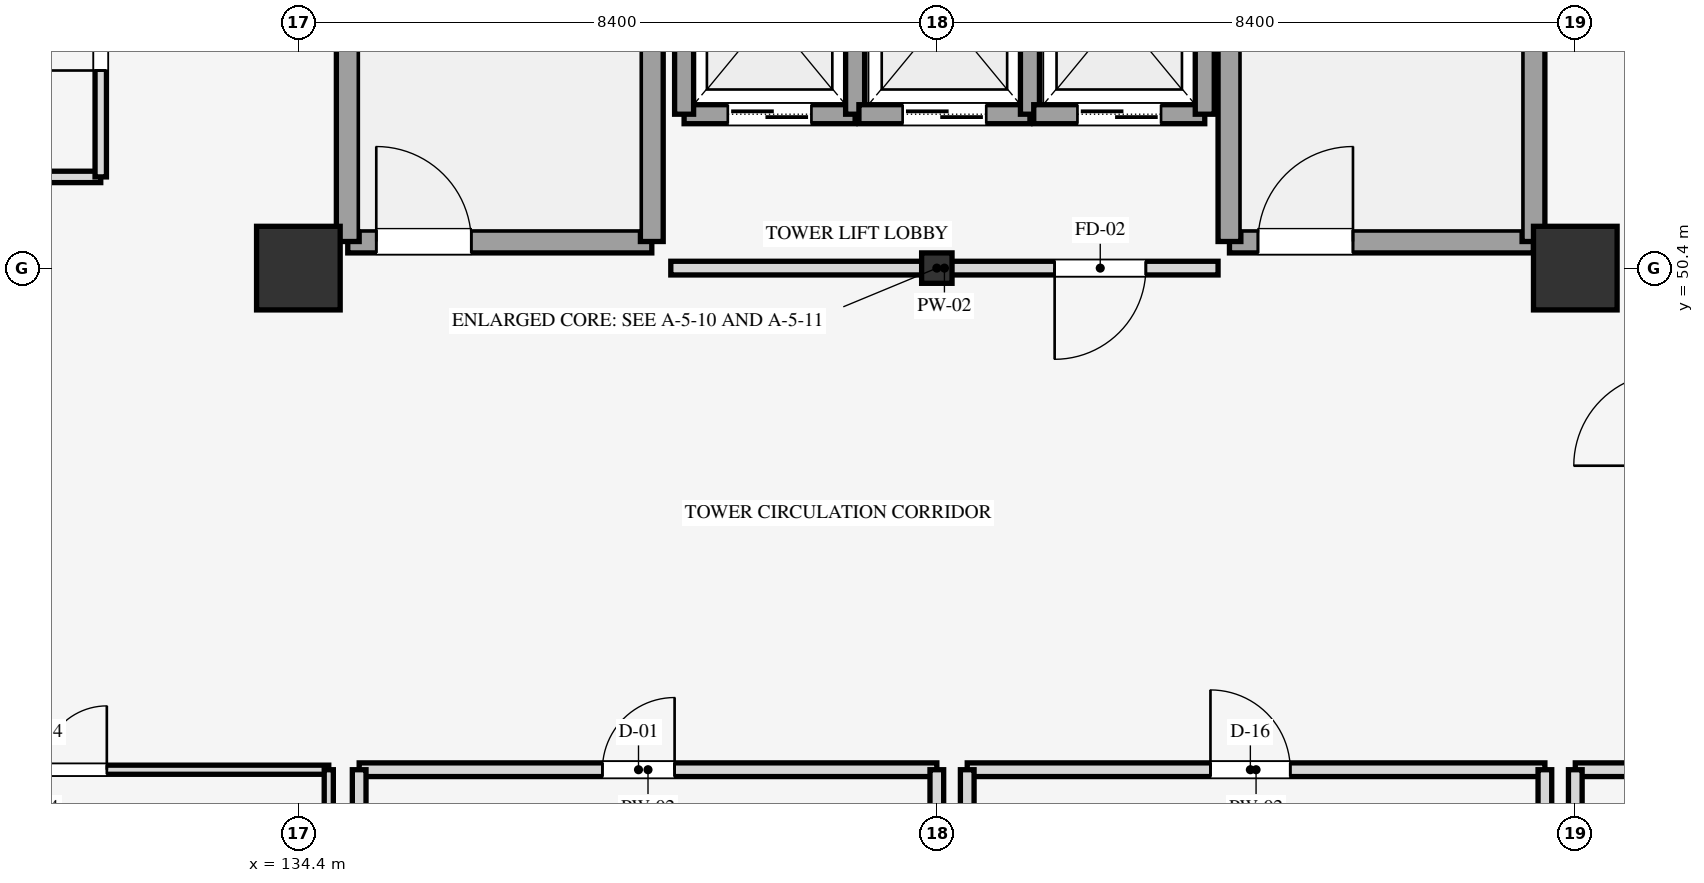
"""IFC4 building model, lengths in metres.
Left out: names, types, materials, properties, quantities, classifications, styles, units other than length and angle.
Written with IfcOpenShell. Run it as: python <this file> out.ifc"""

import sys

from ifc_helpers import new_model, si_unit, direction, frame, frame_2d, origin, origin_2d, place, context, subcontext, project, spatial, rectangle, i_section, extrude, element, fill, save


model = new_model("IFC4")
c1 = context("Model", 3, precision=1e-05, world=origin(), true_north=direction((0.0, 1.0)))
c2 = subcontext(c1, "Body", "Model", "MODEL_VIEW")
j1 = project(units=[si_unit("LENGTHUNIT", "METRE"), si_unit("PLANEANGLEUNIT", "RADIAN")], contexts=[c1])
p1 = place(None, origin())
s1 = spatial("IfcSite", under=j1, at=p1, CompositionType="ELEMENT")
p2 = place(p1, origin())
s2 = spatial("IfcBuilding", under=s1, at=p2, CompositionType="ELEMENT")
p3 = place(p2, frame((0.0, 0.0, 27.9)))
s3 = spatial("IfcBuildingStorey", under=s2, at=p3, CompositionType="ELEMENT", Elevation=27.9)
p4 = place(p3, frame((134.4, 50.4, 0.0), z_axis=(0.0, 0.0, 1.0), x_axis=(1.0, 0.0, 0.0)))
e1 = element("IfcColumn", 1, at=p4, inside=s3, PredefinedType="COLUMN", context=c2, shape_type="SweptSolid", body=[
    extrude(rectangle(XDim=1.1, YDim=1.1, at=origin_2d()), origin(), (0.0, 0.0, 1.0), 4.2),
])
p5 = place(p3, frame((142.8, 50.4, 0.0), z_axis=(0.0, 0.0, 1.0), x_axis=(1.0, 0.0, 0.0)))
e2 = element("IfcColumn", 2, at=p5, inside=s3, PredefinedType="COLUMN", context=c2, shape_type="SweptSolid", body=[
    extrude(i_section(OverallWidth=0.4, OverallDepth=0.4, WebThickness=0.013, FlangeThickness=0.021, FilletRadius=0.022, at=origin_2d()), origin(), (0.0, 0.0, 1.0), 4.2),
])
p6 = place(p3, frame((151.2, 50.4, 0.0), z_axis=(0.0, 0.0, 1.0), x_axis=(1.0, 0.0, 0.0)))
e3 = element("IfcColumn", 3, at=p6, inside=s3, PredefinedType="COLUMN", context=c2, shape_type="SweptSolid", body=[
    extrude(rectangle(XDim=1.1, YDim=1.1, at=origin_2d()), origin(), (0.0, 0.0, 1.0), 4.2),
])
p7 = place(p3, frame((135.05, 50.75, 0.0), z_axis=(0.0, 0.0, 1.0), x_axis=(1.0, 0.0, 0.0)))
e4 = element("IfcWall", 4, at=p7, inside=s3, PredefinedType="SHEAR", context=c2, shape_type="SweptSolid", body=[
    extrude(rectangle(XDim=4.0, YDim=0.3, at=frame_2d((2.0, 0.0))), origin(), (0.0, 0.0, 1.0), 4.2),
])
p8 = place(p7, frame((0.375, 0.0, 0.0)))
e5 = element("IfcOpeningElement", 5, at=p8, cuts=e4, PredefinedType="OPENING", context=c2, shape_type="SweptSolid", body=[
    extrude(rectangle(XDim=1.25, YDim=2.15, at=frame_2d((0.625, 1.075))), frame((0.0, 0.16, 0.0), z_axis=(0.0, -1.0, 0.0), x_axis=(1.0, 0.0, 0.0)), (0.0, 0.0, 1.0), 0.32),
])
for number, where, z_axis, x_axis in (
    (6, (135.05, 50.75, 0.0), (0.0, 0.0, 1.0), (0.0, 1.0, 0.0)),
    (7, (139.05, 50.75, 0.0), (0.0, 0.0, 1.0), (0.0, 1.0, 0.0)),
):
    element("IfcWall", number, at=place(p3, frame(where, z_axis=z_axis, x_axis=x_axis)), inside=s3, PredefinedType="SHEAR", context=c2, shape_type="SweptSolid", body=[
        extrude(rectangle(XDim=14.3, YDim=0.3, at=frame_2d((7.15, 0.0))), origin(), (0.0, 0.0, 1.0), 4.2),
    ])
p9 = place(p3, frame((137.25, 52.4, 0.0), z_axis=(0.0, 0.0, 1.0), x_axis=(0.0, 1.0, 0.0)))
e8 = element("IfcWall", 8, at=p9, inside=s3, PredefinedType="SHEAR", context=c2, shape_type="SweptSolid", body=[
    extrude(rectangle(XDim=11.0, YDim=0.2, at=frame_2d((5.5, 0.0))), origin(), (0.0, 0.0, 1.0), 4.2),
])
p10 = place(p3, frame((146.65, 50.75, 0.0), z_axis=(0.0, 0.0, 1.0), x_axis=(1.0, 0.0, 0.0)))
e9 = element("IfcWall", 9, at=p10, inside=s3, PredefinedType="SHEAR", context=c2, shape_type="SweptSolid", body=[
    extrude(rectangle(XDim=4.0, YDim=0.3, at=frame_2d((2.0, 0.0))), origin(), (0.0, 0.0, 1.0), 4.2),
])
p11 = place(p10, frame((0.375, 0.0, 0.0)))
e10 = element("IfcOpeningElement", 10, at=p11, cuts=e9, PredefinedType="OPENING", context=c2, shape_type="SweptSolid", body=[
    extrude(rectangle(XDim=1.25, YDim=2.15, at=frame_2d((0.625, 1.075))), frame((0.0, 0.16, 0.0), z_axis=(0.0, -1.0, 0.0), x_axis=(1.0, 0.0, 0.0)), (0.0, 0.0, 1.0), 0.32),
])
for number, where, z_axis, x_axis in (
    (11, (146.65, 50.75, 0.0), (0.0, 0.0, 1.0), (0.0, 1.0, 0.0)),
    (12, (150.65, 50.75, 0.0), (0.0, 0.0, 1.0), (0.0, 1.0, 0.0)),
):
    element("IfcWall", number, at=place(p3, frame(where, z_axis=z_axis, x_axis=x_axis)), inside=s3, PredefinedType="SHEAR", context=c2, shape_type="SweptSolid", body=[
        extrude(rectangle(XDim=14.3, YDim=0.3, at=frame_2d((7.15, 0.0))), origin(), (0.0, 0.0, 1.0), 4.2),
    ])
p12 = place(p3, frame((148.85, 52.4, 0.0), z_axis=(0.0, 0.0, 1.0), x_axis=(0.0, 1.0, 0.0)))
e13 = element("IfcWall", 13, at=p12, inside=s3, PredefinedType="SHEAR", context=c2, shape_type="SweptSolid", body=[
    extrude(rectangle(XDim=11.0, YDim=0.2, at=frame_2d((5.5, 0.0))), origin(), (0.0, 0.0, 1.0), 4.2),
])
p13 = place(p3, frame((139.475, 52.425, 0.0), z_axis=(0.0, 0.0, 1.0), x_axis=(1.0, 0.0, 0.0)))
e14 = element("IfcWall", 14, at=p13, inside=s3, PredefinedType="SHEAR", context=c2, shape_type="SweptSolid", body=[
    extrude(rectangle(XDim=2.25, YDim=0.25, at=frame_2d((1.125, 0.0))), origin(), (0.0, 0.0, 1.0), 3.96),
])
p14 = place(p13, frame((0.575, 0.0, 0.0)))
e15 = element("IfcOpeningElement", 15, at=p14, cuts=e14, PredefinedType="OPENING", context=c2, shape_type="SweptSolid", body=[
    extrude(rectangle(XDim=1.1, YDim=2.15, at=frame_2d((0.55, 1.075))), frame((0.0, 0.135, 0.0), z_axis=(0.0, -1.0, 0.0), x_axis=(1.0, 0.0, 0.0)), (0.0, 0.0, 1.0), 0.27),
])
for number, where, z_axis, x_axis in (
    (16, (139.475, 52.425, 0.0), (0.0, 0.0, 1.0), (0.0, 1.0, 0.0)),
    (17, (141.725, 52.425, 0.0), (0.0, 0.0, 1.0), (0.0, 1.0, 0.0)),
):
    element("IfcWall", number, at=place(p3, frame(where, z_axis=z_axis, x_axis=x_axis)), inside=s3, PredefinedType="SHEAR", context=c2, shape_type="SweptSolid", body=[
        extrude(rectangle(XDim=2.65, YDim=0.25, at=frame_2d((1.325, 0.0))), origin(), (0.0, 0.0, 1.0), 3.96),
    ])
p15 = place(p3, frame((141.775, 52.425, 0.0), z_axis=(0.0, 0.0, 1.0), x_axis=(1.0, 0.0, 0.0)))
e18 = element("IfcWall", 18, at=p15, inside=s3, PredefinedType="SHEAR", context=c2, shape_type="SweptSolid", body=[
    extrude(rectangle(XDim=2.25, YDim=0.25, at=frame_2d((1.125, 0.0))), origin(), (0.0, 0.0, 1.0), 3.96),
])
p16 = place(p15, frame((0.575, 0.0, 0.0)))
e19 = element("IfcOpeningElement", 19, at=p16, cuts=e18, PredefinedType="OPENING", context=c2, shape_type="SweptSolid", body=[
    extrude(rectangle(XDim=1.1, YDim=2.15, at=frame_2d((0.55, 1.075))), frame((0.0, 0.135, 0.0), z_axis=(0.0, -1.0, 0.0), x_axis=(1.0, 0.0, 0.0)), (0.0, 0.0, 1.0), 0.27),
])
p17 = place(p3, frame((144.025, 52.425, 0.0), z_axis=(0.0, 0.0, 1.0), x_axis=(0.0, 1.0, 0.0)))
e20 = element("IfcWall", 20, at=p17, inside=s3, PredefinedType="SHEAR", context=c2, shape_type="SweptSolid", body=[
    extrude(rectangle(XDim=2.65, YDim=0.25, at=frame_2d((1.325, 0.0))), origin(), (0.0, 0.0, 1.0), 3.96),
])
p18 = place(p3, frame((144.075, 52.425, 0.0), z_axis=(0.0, 0.0, 1.0), x_axis=(1.0, 0.0, 0.0)))
e21 = element("IfcWall", 21, at=p18, inside=s3, PredefinedType="SHEAR", context=c2, shape_type="SweptSolid", body=[
    extrude(rectangle(XDim=2.25, YDim=0.25, at=frame_2d((1.125, 0.0))), origin(), (0.0, 0.0, 1.0), 3.96),
])
p19 = place(p18, frame((0.575, 0.0, 0.0)))
e22 = element("IfcOpeningElement", 22, at=p19, cuts=e21, PredefinedType="OPENING", context=c2, shape_type="SweptSolid", body=[
    extrude(rectangle(XDim=1.1, YDim=2.15, at=frame_2d((0.55, 1.075))), frame((0.0, 0.135, 0.0), z_axis=(0.0, -1.0, 0.0), x_axis=(1.0, 0.0, 0.0)), (0.0, 0.0, 1.0), 0.27),
])
p20 = place(p3, frame((146.325, 52.425, 0.0), z_axis=(0.0, 0.0, 1.0), x_axis=(0.0, 1.0, 0.0)))
e23 = element("IfcWall", 23, at=p20, inside=s3, PredefinedType="SHEAR", context=c2, shape_type="SweptSolid", body=[
    extrude(rectangle(XDim=2.65, YDim=0.25, at=frame_2d((1.325, 0.0))), origin(), (0.0, 0.0, 1.0), 3.96),
])
p21 = place(p3, frame((139.3, 50.4, 0.0), z_axis=(0.0, 0.0, 1.0), x_axis=(1.0, 0.0, 0.0)))
e24 = element("IfcWall", 24, at=p21, inside=s3, PredefinedType="PARTITIONING", context=c2, shape_type="SweptSolid", body=[
    extrude(rectangle(XDim=7.2, YDim=0.18, at=frame_2d((3.6, 0.0))), origin(), (0.0, 0.0, 1.0), 3.24),
])
p22 = place(p21, frame((5.05, 0.0, 0.0)))
e25 = element("IfcOpeningElement", 25, at=p22, cuts=e24, PredefinedType="OPENING", context=c2, shape_type="SweptSolid", body=[
    extrude(rectangle(XDim=1.2, YDim=2.15, at=frame_2d((0.6, 1.075))), frame((0.0, 0.1, 0.0), z_axis=(0.0, -1.0, 0.0), x_axis=(1.0, 0.0, 0.0)), (0.0, 0.0, 1.0), 0.2),
])
p23 = place(p3, frame((127.75, 51.6, 0.0), z_axis=(0.0, 0.0, 1.0), x_axis=(1.0, 0.0, 0.0)))
e26 = element("IfcWall", 26, at=p23, inside=s3, PredefinedType="PARTITIONING", context=c2, shape_type="SweptSolid", body=[
    extrude(rectangle(XDim=4.05, YDim=0.15, at=frame_2d((2.025, 0.0))), origin(), (0.0, 0.0, 1.0), 3.24),
])
p24 = place(p3, frame((131.8, 51.6, 0.0), z_axis=(0.0, 0.0, 1.0), x_axis=(0.0, 1.0, 0.0)))
e27 = element("IfcWall", 27, at=p24, inside=s3, PredefinedType="PARTITIONING", context=c2, shape_type="SweptSolid", body=[
    extrude(rectangle(XDim=4.0, YDim=0.15, at=frame_2d((2.0, 0.0))), origin(), (0.0, 0.0, 1.0), 3.24),
])
p25 = place(p24, frame((1.4, 0.0, 0.0)))
e28 = element("IfcOpeningElement", 28, at=p25, cuts=e27, PredefinedType="OPENING", context=c2, shape_type="SweptSolid", body=[
    extrude(rectangle(XDim=1.12, YDim=2.14, at=frame_2d((0.56, 1.07))), frame((0.0, 0.085, 0.0), z_axis=(0.0, -1.0, 0.0), x_axis=(1.0, 0.0, 0.0)), (0.0, 0.0, 1.0), 0.17),
])
p26 = place(p3, frame((127.0, 43.8, 0.0), z_axis=(0.0, 0.0, 1.0), x_axis=(1.0, 0.0, 0.0)))
e29 = element("IfcWall", 29, at=p26, inside=s3, PredefinedType="PARTITIONING", context=c2, shape_type="SweptSolid", body=[
    extrude(rectangle(XDim=7.8, YDim=0.12, at=frame_2d((3.9, 0.0))), origin(), (0.0, 0.0, 1.0), 3.24),
])
p27 = place(p26, frame((3.2, 0.0, 0.0)))
e30 = element("IfcOpeningElement", 30, at=p27, cuts=e29, PredefinedType="OPENING", context=c2, shape_type="SweptSolid", body=[
    extrude(rectangle(XDim=1.68, YDim=2.24, at=frame_2d((0.84, 1.12))), frame((0.0, 0.07, 0.0), z_axis=(0.0, -1.0, 0.0), x_axis=(1.0, 0.0, 0.0)), (0.0, 0.0, 1.0), 0.14),
])
p28 = place(p3, frame((134.8, 34.4, 0.0), z_axis=(0.0, 0.0, 1.0), x_axis=(0.0, 1.0, 0.0)))
e31 = element("IfcWall", 31, at=p28, inside=s3, PredefinedType="PARTITIONING", context=c2, shape_type="SweptSolid", body=[
    extrude(rectangle(XDim=9.4, YDim=0.12, at=frame_2d((4.7, 0.0))), origin(), (0.0, 0.0, 1.0), 3.24),
])
p29 = place(p3, frame((135.2, 43.8, 0.0), z_axis=(0.0, 0.0, 1.0), x_axis=(1.0, 0.0, 0.0)))
e32 = element("IfcWall", 32, at=p29, inside=s3, PredefinedType="PARTITIONING", context=c2, shape_type="SweptSolid", body=[
    extrude(rectangle(XDim=7.6, YDim=0.18, at=frame_2d((3.8, 0.0))), origin(), (0.0, 0.0, 1.0), 3.24),
])
p30 = place(p29, frame((3.2, 0.0, 0.0)))
e33 = element("IfcOpeningElement", 33, at=p30, cuts=e32, PredefinedType="OPENING", context=c2, shape_type="SweptSolid", body=[
    extrude(rectangle(XDim=0.95, YDim=2.1, at=frame_2d((0.475, 1.05))), frame((0.0, 0.1, 0.0), z_axis=(0.0, -1.0, 0.0), x_axis=(1.0, 0.0, 0.0)), (0.0, 0.0, 1.0), 0.2),
])
for number, where, z_axis, x_axis in (
    (34, (135.2, 34.4, 0.0), (0.0, 0.0, 1.0), (0.0, 1.0, 0.0)),
    (35, (142.8, 34.4, 0.0), (0.0, 0.0, 1.0), (0.0, 1.0, 0.0)),
):
    element("IfcWall", number, at=place(p3, frame(where, z_axis=z_axis, x_axis=x_axis)), inside=s3, PredefinedType="PARTITIONING", context=c2, shape_type="SweptSolid", body=[
        extrude(rectangle(XDim=9.4, YDim=0.18, at=frame_2d((4.7, 0.0))), origin(), (0.0, 0.0, 1.0), 3.24),
    ])
p31 = place(p3, frame((143.2, 43.8, 0.0), z_axis=(0.0, 0.0, 1.0), x_axis=(1.0, 0.0, 0.0)))
e36 = element("IfcWall", 36, at=p31, inside=s3, PredefinedType="PARTITIONING", context=c2, shape_type="SweptSolid", body=[
    extrude(rectangle(XDim=7.6, YDim=0.18, at=frame_2d((3.8, 0.0))), origin(), (0.0, 0.0, 1.0), 3.24),
])
p32 = place(p31, frame((3.2, 0.0, 0.0)))
e37 = element("IfcOpeningElement", 37, at=p32, cuts=e36, PredefinedType="OPENING", context=c2, shape_type="SweptSolid", body=[
    extrude(rectangle(XDim=1.05, YDim=2.16, at=frame_2d((0.525, 1.08))), frame((0.0, 0.1, 0.0), z_axis=(0.0, -1.0, 0.0), x_axis=(1.0, 0.0, 0.0)), (0.0, 0.0, 1.0), 0.2),
])
for number, where, z_axis, x_axis in (
    (38, (143.2, 34.4, 0.0), (0.0, 0.0, 1.0), (0.0, 1.0, 0.0)),
    (39, (150.8, 34.4, 0.0), (0.0, 0.0, 1.0), (0.0, 1.0, 0.0)),
):
    element("IfcWall", number, at=place(p3, frame(where, z_axis=z_axis, x_axis=x_axis)), inside=s3, PredefinedType="PARTITIONING", context=c2, shape_type="SweptSolid", body=[
        extrude(rectangle(XDim=9.4, YDim=0.18, at=frame_2d((4.7, 0.0))), origin(), (0.0, 0.0, 1.0), 3.24),
    ])
p33 = place(p3, frame((151.2, 43.8, 0.0), z_axis=(0.0, 0.0, 1.0), x_axis=(1.0, 0.0, 0.0)))
e40 = element("IfcWall", 40, at=p33, inside=s3, PredefinedType="PARTITIONING", context=c2, shape_type="SweptSolid", body=[
    extrude(rectangle(XDim=7.8, YDim=0.18, at=frame_2d((3.9, 0.0))), origin(), (0.0, 0.0, 1.0), 3.24),
])
p34 = place(p33, frame((3.2, 0.0, 0.0)))
e41 = element("IfcOpeningElement", 41, at=p34, cuts=e40, PredefinedType="OPENING", context=c2, shape_type="SweptSolid", body=[
    extrude(rectangle(XDim=0.95, YDim=2.1, at=frame_2d((0.475, 1.05))), frame((0.0, 0.1, 0.0), z_axis=(0.0, -1.0, 0.0), x_axis=(1.0, 0.0, 0.0)), (0.0, 0.0, 1.0), 0.2),
])
p35 = place(p3, frame((151.2, 34.4, 0.0), z_axis=(0.0, 0.0, 1.0), x_axis=(0.0, 1.0, 0.0)))
e42 = element("IfcWall", 42, at=p35, inside=s3, PredefinedType="PARTITIONING", context=c2, shape_type="SweptSolid", body=[
    extrude(rectangle(XDim=9.4, YDim=0.18, at=frame_2d((4.7, 0.0))), origin(), (0.0, 0.0, 1.0), 3.24),
])
p36 = place(p8, origin())
e43 = element("IfcDoor", 43, at=p36, inside=s3, OperationType="SINGLE_SWING_LEFT", PredefinedType="DOOR", context=c2, shape_type="SweptSolid", body=[
    extrude(rectangle(XDim=1.25, YDim=2.15, at=frame_2d((0.625, 1.075))), frame((0.0, 0.025, 0.0), z_axis=(0.0, -1.0, 0.0), x_axis=(1.0, 0.0, 0.0)), (0.0, 0.0, 1.0), 0.05),
])
fill(e5, e43)
p37 = place(p11, origin())
e44 = element("IfcDoor", 44, at=p37, inside=s3, OperationType="SINGLE_SWING_RIGHT", PredefinedType="DOOR", context=c2, shape_type="SweptSolid", body=[
    extrude(rectangle(XDim=1.25, YDim=2.15, at=frame_2d((0.625, 1.075))), frame((0.0, 0.025, 0.0), z_axis=(0.0, -1.0, 0.0), x_axis=(1.0, 0.0, 0.0)), (0.0, 0.0, 1.0), 0.05),
])
fill(e10, e44)
p38 = place(p14, origin())
e45 = element("IfcDoor", 45, at=p38, inside=s3, OperationType="DOUBLE_DOOR_SLIDING", PredefinedType="DOOR", context=c2, shape_type="SweptSolid", body=[
    extrude(rectangle(XDim=1.1, YDim=2.15, at=frame_2d((0.55, 1.075))), frame((0.0, 0.025, 0.0), z_axis=(0.0, -1.0, 0.0), x_axis=(1.0, 0.0, 0.0)), (0.0, 0.0, 1.0), 0.05),
])
fill(e15, e45)
p39 = place(p16, origin())
e46 = element("IfcDoor", 46, at=p39, inside=s3, OperationType="DOUBLE_DOOR_SLIDING", PredefinedType="DOOR", context=c2, shape_type="SweptSolid", body=[
    extrude(rectangle(XDim=1.1, YDim=2.15, at=frame_2d((0.55, 1.075))), frame((0.0, 0.025, 0.0), z_axis=(0.0, -1.0, 0.0), x_axis=(1.0, 0.0, 0.0)), (0.0, 0.0, 1.0), 0.05),
])
fill(e19, e46)
p40 = place(p19, origin())
e47 = element("IfcDoor", 47, at=p40, inside=s3, OperationType="DOUBLE_DOOR_SLIDING", PredefinedType="DOOR", context=c2, shape_type="SweptSolid", body=[
    extrude(rectangle(XDim=1.1, YDim=2.15, at=frame_2d((0.55, 1.075))), frame((0.0, 0.025, 0.0), z_axis=(0.0, -1.0, 0.0), x_axis=(1.0, 0.0, 0.0)), (0.0, 0.0, 1.0), 0.05),
])
fill(e22, e47)
p41 = place(p22, frame((1.2, 0.0, 0.0), z_axis=(0.0, 0.0, 1.0), x_axis=(-1.0, 0.0, 0.0)))
e48 = element("IfcDoor", 48, at=p41, inside=s3, OperationType="SINGLE_SWING_RIGHT", PredefinedType="DOOR", context=c2, shape_type="SweptSolid", body=[
    extrude(rectangle(XDim=1.2, YDim=2.15, at=frame_2d((0.6, 1.075))), frame((0.0, 0.025, 0.0), z_axis=(0.0, -1.0, 0.0), x_axis=(1.0, 0.0, 0.0)), (0.0, 0.0, 1.0), 0.05),
])
fill(e25, e48)
p42 = place(p25, origin())
e49 = element("IfcDoor", 49, at=p42, inside=s3, OperationType="SINGLE_SWING_LEFT", PredefinedType="DOOR", context=c2, shape_type="SweptSolid", body=[
    extrude(rectangle(XDim=1.12, YDim=2.14, at=frame_2d((0.56, 1.07))), frame((0.0, 0.025, 0.0), z_axis=(0.0, -1.0, 0.0), x_axis=(1.0, 0.0, 0.0)), (0.0, 0.0, 1.0), 0.05),
])
fill(e28, e49)
p43 = place(p27, origin())
e50 = element("IfcDoor", 50, at=p43, inside=s3, OperationType="DOUBLE_DOOR_SINGLE_SWING", PredefinedType="DOOR", context=c2, shape_type="SweptSolid", body=[
    extrude(rectangle(XDim=1.68, YDim=2.24, at=frame_2d((0.84, 1.12))), frame((0.0, 0.025, 0.0), z_axis=(0.0, -1.0, 0.0), x_axis=(1.0, 0.0, 0.0)), (0.0, 0.0, 1.0), 0.05),
])
fill(e30, e50)
p44 = place(p30, origin())
e51 = element("IfcDoor", 51, at=p44, inside=s3, OperationType="SINGLE_SWING_RIGHT", PredefinedType="DOOR", context=c2, shape_type="SweptSolid", body=[
    extrude(rectangle(XDim=0.95, YDim=2.1, at=frame_2d((0.475, 1.05))), frame((0.0, 0.025, 0.0), z_axis=(0.0, -1.0, 0.0), x_axis=(1.0, 0.0, 0.0)), (0.0, 0.0, 1.0), 0.05),
])
fill(e33, e51)
p45 = place(p32, origin())
e52 = element("IfcDoor", 52, at=p45, inside=s3, OperationType="SINGLE_SWING_LEFT", PredefinedType="DOOR", context=c2, shape_type="SweptSolid", body=[
    extrude(rectangle(XDim=1.05, YDim=2.16, at=frame_2d((0.525, 1.08))), frame((0.0, 0.025, 0.0), z_axis=(0.0, -1.0, 0.0), x_axis=(1.0, 0.0, 0.0)), (0.0, 0.0, 1.0), 0.05),
])
fill(e37, e52)
save(model, sys.argv[1])
